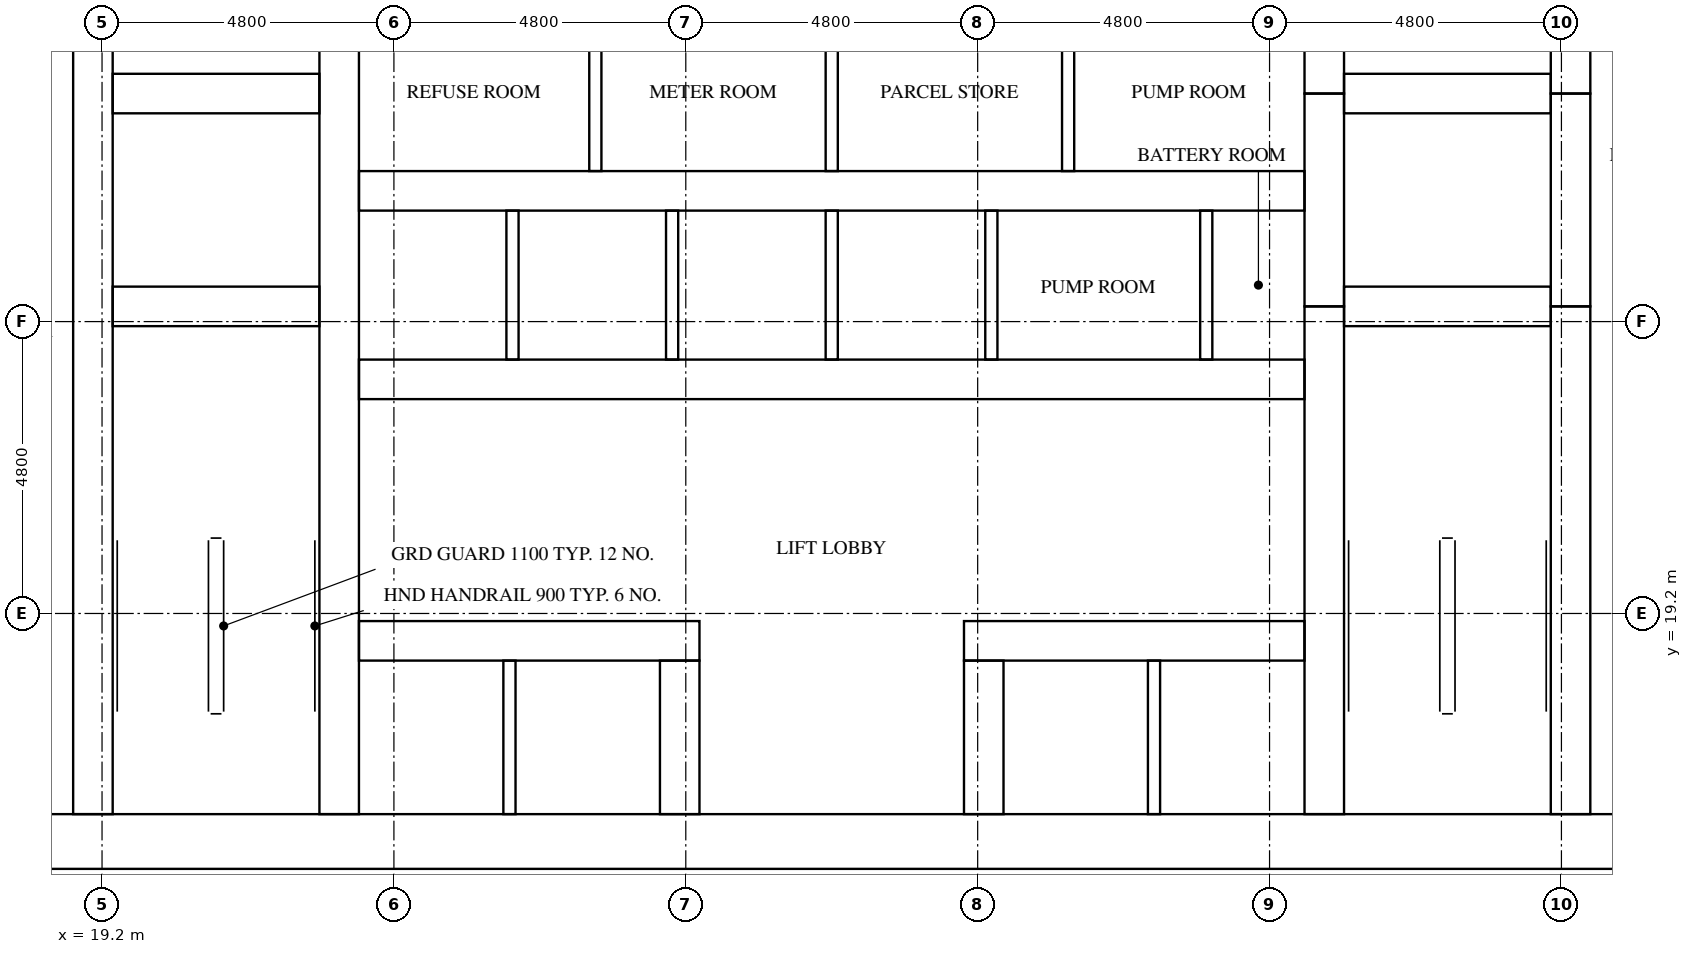
"""IFC4 building model, lengths in metres.
Left out: names, types, materials, properties, quantities, classifications, styles, units other than length and angle.
Written with IfcOpenShell. Run it as: python <this file> out.ifc"""

import sys

from ifc_helpers import new_model, si_unit, direction, frame, frame_2d, origin, place, context, subcontext, project, spatial, rectangle, extrude, element, fill, save


model = new_model("IFC4")
c1 = context("Model", 3, precision=1e-05, world=origin(), true_north=direction((0.0, 1.0)))
c2 = subcontext(c1, "Body", "Model", "MODEL_VIEW")
j1 = project(units=[si_unit("LENGTHUNIT", "METRE"), si_unit("PLANEANGLEUNIT", "RADIAN")], contexts=[c1])
p1 = place(None, origin())
s1 = spatial("IfcSite", under=j1, at=p1, CompositionType="ELEMENT")
p2 = place(p1, origin())
s2 = spatial("IfcBuilding", under=s1, at=p2, CompositionType="ELEMENT")
p3 = place(p2, frame((0.0, 0.0, 69.8)))
s3 = spatial("IfcBuildingStorey", under=s2, at=p3, CompositionType="ELEMENT", Elevation=69.8)
p4 = place(p3, frame((15.0, 15.45, 0.0), z_axis=(0.0, 0.0, 1.0), x_axis=(1.0, 0.0, 0.0)))
e1 = element("IfcWall", 1, at=p4, inside=s3, PredefinedType="SHEAR", context=c2, shape_type="SweptSolid", body=[
    extrude(rectangle(XDim=32.4, YDim=0.9, at=frame_2d((16.2, 0.0))), origin(), (0.0, 0.0, 1.0), 3.2),
])
p5 = place(p4, frame((15.3, 0.0, 0.0)))
e2 = element("IfcOpeningElement", 2, at=p5, cuts=e1, PredefinedType="OPENING", context=c2, shape_type="SweptSolid", body=[
    extrude(rectangle(XDim=1.8, YDim=2.1, at=frame_2d((0.9, 1.05))), frame((0.0, 0.46, 0.0), z_axis=(0.0, -1.0, 0.0), x_axis=(1.0, 0.0, 0.0)), (0.0, 0.0, 1.0), 0.92),
])
p6 = place(p3, frame((19.05, 15.9, 0.0), z_axis=(0.0, 0.0, 1.0), x_axis=(0.0, 1.0, 0.0)))
e3 = element("IfcWall", 3, at=p6, inside=s3, PredefinedType="SHEAR", context=c2, shape_type="SweptSolid", body=[
    extrude(rectangle(XDim=15.025, YDim=0.65, at=frame_2d((7.513, 0.0))), origin(), (0.0, 0.0, 1.0), 3.2),
])
p7 = place(p6, frame((9.55, 0.0, 0.0)))
e4 = element("IfcOpeningElement", 4, at=p7, cuts=e3, PredefinedType="OPENING", context=c2, shape_type="SweptSolid", body=[
    extrude(rectangle(XDim=1.1, YDim=2.1, at=frame_2d((0.55, 1.05))), frame((0.0, 0.335, 0.0), z_axis=(0.0, -1.0, 0.0), x_axis=(1.0, 0.0, 0.0)), (0.0, 0.0, 1.0), 0.67),
])
p8 = place(p6, frame((13.05, 0.0, 0.0)))
e5 = element("IfcOpeningElement", 5, at=p8, cuts=e3, PredefinedType="OPENING", context=c2, shape_type="SweptSolid", body=[
    extrude(rectangle(XDim=1.1, YDim=2.1, at=frame_2d((0.55, 1.05))), frame((0.0, 0.335, 0.0), z_axis=(0.0, -1.0, 0.0), x_axis=(1.0, 0.0, 0.0)), (0.0, 0.0, 1.0), 0.67),
])
p9 = place(p6, frame((0.3, 0.0, 0.0)))
e6 = element("IfcOpeningElement", 6, at=p9, cuts=e3, PredefinedType="OPENING", context=c2, shape_type="SweptSolid", body=[
    extrude(rectangle(XDim=1.2, YDim=2.1, at=frame_2d((0.6, 1.05))), frame((0.0, 0.335, 0.0), z_axis=(0.0, -1.0, 0.0), x_axis=(1.0, 0.0, 0.0)), (0.0, 0.0, 1.0), 0.67),
])
p10 = place(p3, frame((23.1, 15.9, 0.0), z_axis=(0.0, 0.0, 1.0), x_axis=(0.0, 1.0, 0.0)))
e7 = element("IfcWall", 7, at=p10, inside=s3, PredefinedType="SHEAR", context=c2, shape_type="SweptSolid", body=[
    extrude(rectangle(XDim=21.0, YDim=0.65, at=frame_2d((10.5, 0.0))), origin(), (0.0, 0.0, 1.0), 3.2),
])
p11 = place(p3, frame((39.3, 15.9, 0.0), z_axis=(0.0, 0.0, 1.0), x_axis=(0.0, 1.0, 0.0)))
e8 = element("IfcWall", 8, at=p11, inside=s3, PredefinedType="SHEAR", context=c2, shape_type="SweptSolid", body=[
    extrude(rectangle(XDim=8.35, YDim=0.65, at=frame_2d((4.175, 0.0))), origin(), (0.0, 0.0, 1.0), 3.2),
])
p12 = place(p3, frame((39.3, 24.25, 0.0), z_axis=(0.0, 0.0, 1.0), x_axis=(0.0, 1.0, 0.0)))
e9 = element("IfcWall", 9, at=p12, inside=s3, PredefinedType="SHEAR", context=c2, shape_type="SweptSolid", body=[
    extrude(rectangle(XDim=3.5, YDim=0.65, at=frame_2d((1.75, 0.0))), origin(), (0.0, 0.0, 1.0), 3.2),
])
p13 = place(p3, frame((39.3, 27.75, 0.0), z_axis=(0.0, 0.0, 1.0), x_axis=(0.0, 1.0, 0.0)))
e10 = element("IfcWall", 10, at=p13, inside=s3, PredefinedType="SHEAR", context=c2, shape_type="SweptSolid", body=[
    extrude(rectangle(XDim=9.15, YDim=0.65, at=frame_2d((4.575, 0.0))), origin(), (0.0, 0.0, 1.0), 3.2),
])
p14 = place(p3, frame((43.35, 15.9, 0.0), z_axis=(0.0, 0.0, 1.0), x_axis=(0.0, 1.0, 0.0)))
e11 = element("IfcWall", 11, at=p14, inside=s3, PredefinedType="SHEAR", context=c2, shape_type="SweptSolid", body=[
    extrude(rectangle(XDim=8.35, YDim=0.65, at=frame_2d((4.175, 0.0))), origin(), (0.0, 0.0, 1.0), 3.2),
])
p15 = place(p14, frame((0.3, 0.0, 0.0)))
e12 = element("IfcOpeningElement", 12, at=p15, cuts=e11, PredefinedType="OPENING", context=c2, shape_type="SweptSolid", body=[
    extrude(rectangle(XDim=1.2, YDim=2.1, at=frame_2d((0.6, 1.05))), frame((0.0, 0.335, 0.0), z_axis=(0.0, -1.0, 0.0), x_axis=(1.0, 0.0, 0.0)), (0.0, 0.0, 1.0), 0.67),
])
p16 = place(p3, frame((43.35, 24.25, 0.0), z_axis=(0.0, 0.0, 1.0), x_axis=(0.0, 1.0, 0.0)))
e13 = element("IfcWall", 13, at=p16, inside=s3, PredefinedType="SHEAR", context=c2, shape_type="SweptSolid", body=[
    extrude(rectangle(XDim=3.5, YDim=0.65, at=frame_2d((1.75, 0.0))), origin(), (0.0, 0.0, 1.0), 3.2),
])
p17 = place(p16, frame((1.2, 0.0, 0.0)))
e14 = element("IfcOpeningElement", 14, at=p17, cuts=e13, PredefinedType="OPENING", context=c2, shape_type="SweptSolid", body=[
    extrude(rectangle(XDim=1.1, YDim=2.1, at=frame_2d((0.55, 1.05))), frame((0.0, 0.335, 0.0), z_axis=(0.0, -1.0, 0.0), x_axis=(1.0, 0.0, 0.0)), (0.0, 0.0, 1.0), 0.67),
])
p18 = place(p3, frame((43.35, 27.75, 0.0), z_axis=(0.0, 0.0, 1.0), x_axis=(0.0, 1.0, 0.0)))
e15 = element("IfcWall", 15, at=p18, inside=s3, PredefinedType="SHEAR", context=c2, shape_type="SweptSolid", body=[
    extrude(rectangle(XDim=9.15, YDim=0.65, at=frame_2d((4.575, 0.0))), origin(), (0.0, 0.0, 1.0), 3.2),
])
p19 = place(p18, frame((7.65, 0.0, 0.0)))
e16 = element("IfcOpeningElement", 16, at=p19, cuts=e15, PredefinedType="OPENING", context=c2, shape_type="SweptSolid", body=[
    extrude(rectangle(XDim=1.2, YDim=2.1, at=frame_2d((0.6, 1.05))), frame((0.0, 0.335, 0.0), z_axis=(0.0, -1.0, 0.0), x_axis=(1.0, 0.0, 0.0)), (0.0, 0.0, 1.0), 0.67),
])
for number, where, z_axis, x_axis in (
    (17, (19.375, 24.25, 0.0), (0.0, 0.0, 1.0), (1.0, 0.0, 0.0)),
    (18, (19.375, 27.75, 0.0), (0.0, 0.0, 1.0), (1.0, 0.0, 0.0)),
    (19, (39.625, 24.25, 0.0), (0.0, 0.0, 1.0), (1.0, 0.0, 0.0)),
    (20, (39.625, 27.75, 0.0), (0.0, 0.0, 1.0), (1.0, 0.0, 0.0)),
):
    element("IfcWall", number, at=place(p3, frame(where, z_axis=z_axis, x_axis=x_axis)), inside=s3, PredefinedType="SHEAR", context=c2, shape_type="SweptSolid", body=[
        extrude(rectangle(XDim=3.4, YDim=0.65, at=frame_2d((1.7, 0.0))), origin(), (0.0, 0.0, 1.0), 3.2),
    ])
p20 = place(p3, frame((23.425, 18.75, 0.0), z_axis=(0.0, 0.0, 1.0), x_axis=(1.0, 0.0, 0.0)))
e21 = element("IfcWall", 21, at=p20, inside=s3, PredefinedType="SHEAR", context=c2, shape_type="SweptSolid", body=[
    extrude(rectangle(XDim=5.6, YDim=0.65, at=frame_2d((2.8, 0.0))), origin(), (0.0, 0.0, 1.0), 3.2),
])
p21 = place(p20, frame((0.637, 0.0, 0.0)))
e22 = element("IfcOpeningElement", 22, at=p21, cuts=e21, PredefinedType="OPENING", context=c2, shape_type="SweptSolid", body=[
    extrude(rectangle(XDim=1.1, YDim=2.1, at=frame_2d((0.55, 1.05))), frame((0.0, 0.335, 0.0), z_axis=(0.0, -1.0, 0.0), x_axis=(1.0, 0.0, 0.0)), (0.0, 0.0, 1.0), 0.67),
])
p22 = place(p20, frame((3.212, 0.0, 0.0)))
e23 = element("IfcOpeningElement", 23, at=p22, cuts=e21, PredefinedType="OPENING", context=c2, shape_type="SweptSolid", body=[
    extrude(rectangle(XDim=1.1, YDim=2.1, at=frame_2d((0.55, 1.05))), frame((0.0, 0.335, 0.0), z_axis=(0.0, -1.0, 0.0), x_axis=(1.0, 0.0, 0.0)), (0.0, 0.0, 1.0), 0.67),
])
p23 = place(p3, frame((33.375, 18.75, 0.0), z_axis=(0.0, 0.0, 1.0), x_axis=(1.0, 0.0, 0.0)))
e24 = element("IfcWall", 24, at=p23, inside=s3, PredefinedType="SHEAR", context=c2, shape_type="SweptSolid", body=[
    extrude(rectangle(XDim=5.6, YDim=0.65, at=frame_2d((2.8, 0.0))), origin(), (0.0, 0.0, 1.0), 3.2),
])
p24 = place(p23, frame((1.288, 0.0, 0.0)))
e25 = element("IfcOpeningElement", 25, at=p24, cuts=e24, PredefinedType="OPENING", context=c2, shape_type="SweptSolid", body=[
    extrude(rectangle(XDim=1.1, YDim=2.1, at=frame_2d((0.55, 1.05))), frame((0.0, 0.335, 0.0), z_axis=(0.0, -1.0, 0.0), x_axis=(1.0, 0.0, 0.0)), (0.0, 0.0, 1.0), 0.67),
])
p25 = place(p23, frame((3.863, 0.0, 0.0)))
e26 = element("IfcOpeningElement", 26, at=p25, cuts=e24, PredefinedType="OPENING", context=c2, shape_type="SweptSolid", body=[
    extrude(rectangle(XDim=1.1, YDim=2.1, at=frame_2d((0.55, 1.05))), frame((0.0, 0.335, 0.0), z_axis=(0.0, -1.0, 0.0), x_axis=(1.0, 0.0, 0.0)), (0.0, 0.0, 1.0), 0.67),
])
p26 = place(p3, frame((23.425, 23.05, 0.0), z_axis=(0.0, 0.0, 1.0), x_axis=(1.0, 0.0, 0.0)))
e27 = element("IfcWall", 27, at=p26, inside=s3, PredefinedType="SHEAR", context=c2, shape_type="SweptSolid", body=[
    extrude(rectangle(XDim=15.55, YDim=0.65, at=frame_2d((7.775, 0.0))), origin(), (0.0, 0.0, 1.0), 3.2),
])
p27 = place(p26, frame((0.663, 0.0, 0.0)))
e28 = element("IfcOpeningElement", 28, at=p27, cuts=e27, PredefinedType="OPENING", context=c2, shape_type="SweptSolid", body=[
    extrude(rectangle(XDim=1.1, YDim=2.1, at=frame_2d((0.55, 1.05))), frame((0.0, 0.335, 0.0), z_axis=(0.0, -1.0, 0.0), x_axis=(1.0, 0.0, 0.0)), (0.0, 0.0, 1.0), 0.67),
])
p28 = place(p26, frame((3.288, 0.0, 0.0)))
e29 = element("IfcOpeningElement", 29, at=p28, cuts=e27, PredefinedType="OPENING", context=c2, shape_type="SweptSolid", body=[
    extrude(rectangle(XDim=1.1, YDim=2.1, at=frame_2d((0.55, 1.05))), frame((0.0, 0.335, 0.0), z_axis=(0.0, -1.0, 0.0), x_axis=(1.0, 0.0, 0.0)), (0.0, 0.0, 1.0), 0.67),
])
p29 = place(p26, frame((11.667, 0.0, 0.0)))
e30 = element("IfcOpeningElement", 30, at=p29, cuts=e27, PredefinedType="OPENING", context=c2, shape_type="SweptSolid", body=[
    extrude(rectangle(XDim=1.0, YDim=2.1, at=frame_2d((0.5, 1.05))), frame((0.0, 0.335, 0.0), z_axis=(0.0, -1.0, 0.0), x_axis=(1.0, 0.0, 0.0)), (0.0, 0.0, 1.0), 0.67),
])
p30 = place(p26, frame((14.292, 0.0, 0.0)))
e31 = element("IfcOpeningElement", 31, at=p30, cuts=e27, PredefinedType="OPENING", context=c2, shape_type="SweptSolid", body=[
    extrude(rectangle(XDim=1.0, YDim=2.1, at=frame_2d((0.5, 1.05))), frame((0.0, 0.335, 0.0), z_axis=(0.0, -1.0, 0.0), x_axis=(1.0, 0.0, 0.0)), (0.0, 0.0, 1.0), 0.67),
])
p31 = place(p3, frame((23.425, 26.15, 0.0), z_axis=(0.0, 0.0, 1.0), x_axis=(1.0, 0.0, 0.0)))
e32 = element("IfcWall", 32, at=p31, inside=s3, PredefinedType="SHEAR", context=c2, shape_type="SweptSolid", body=[
    extrude(rectangle(XDim=15.55, YDim=0.65, at=frame_2d((7.775, 0.0))), origin(), (0.0, 0.0, 1.0), 3.2),
])
for number, where, z_axis, x_axis in (
    (33, (28.7, 15.9, 0.0), (0.0, 0.0, 1.0), (0.0, 1.0, 0.0)),
    (34, (33.7, 15.9, 0.0), (0.0, 0.0, 1.0), (0.0, 1.0, 0.0)),
):
    element("IfcWall", number, at=place(p3, frame(where, z_axis=z_axis, x_axis=x_axis)), inside=s3, PredefinedType="SHEAR", context=c2, shape_type="SweptSolid", body=[
        extrude(rectangle(XDim=2.525, YDim=0.65, at=frame_2d((1.263, 0.0))), origin(), (0.0, 0.0, 1.0), 3.2),
    ])
for number, where, z_axis, x_axis in (
    (35, (25.95, 23.375, 0.0), (0.0, 0.0, 1.0), (0.0, 1.0, 0.0)),
    (36, (28.575, 23.375, 0.0), (0.0, 0.0, 1.0), (0.0, 1.0, 0.0)),
    (37, (31.2, 23.375, 0.0), (0.0, 0.0, 1.0), (0.0, 1.0, 0.0)),
    (38, (33.825, 23.375, 0.0), (0.0, 0.0, 1.0), (0.0, 1.0, 0.0)),
):
    element("IfcWall", number, at=place(p3, frame(where, z_axis=z_axis, x_axis=x_axis)), inside=s3, PredefinedType="SOLIDWALL", context=c2, shape_type="SweptSolid", body=[
        extrude(rectangle(XDim=2.45, YDim=0.2, at=frame_2d((1.225, 0.0))), origin(), (0.0, 0.0, 1.0), 3.2),
    ])
for number, where, z_axis, x_axis in (
    (39, (25.9, 15.9, 0.0), (0.0, 0.0, 1.0), (0.0, 1.0, 0.0)),
    (40, (36.5, 15.9, 0.0), (0.0, 0.0, 1.0), (0.0, 1.0, 0.0)),
):
    element("IfcWall", number, at=place(p3, frame(where, z_axis=z_axis, x_axis=x_axis)), inside=s3, PredefinedType="SOLIDWALL", context=c2, shape_type="SweptSolid", body=[
        extrude(rectangle(XDim=2.525, YDim=0.2, at=frame_2d((1.263, 0.0))), origin(), (0.0, 0.0, 1.0), 3.2),
    ])
for number, where, z_axis, x_axis in (
    (41, (37.359, 23.375, 0.0), (0.0, 0.0, 1.0), (0.0, 1.0, 0.0)),
    (42, (27.312, 26.475, 0.0), (0.0, 0.0, 1.0), (0.0, 1.0, 0.0)),
    (43, (31.2, 26.475, 0.0), (0.0, 0.0, 1.0), (0.0, 1.0, 0.0)),
    (44, (35.087, 26.475, 0.0), (0.0, 0.0, 1.0), (0.0, 1.0, 0.0)),
):
    element("IfcWall", number, at=place(p3, frame(where, z_axis=z_axis, x_axis=x_axis)), inside=s3, PredefinedType="PARTITIONING", context=c2, shape_type="SweptSolid", body=[
        extrude(rectangle(XDim=2.45, YDim=0.2, at=frame_2d((1.225, 0.0))), origin(), (0.0, 0.0, 1.0), 3.2),
    ])
p32 = place(p21, origin())
e45 = element("IfcDoor", 45, at=p32, inside=s3, OperationType="DOUBLE_DOOR_SLIDING", PredefinedType="DOOR", context=c2, shape_type="SweptSolid", body=[
    extrude(rectangle(XDim=1.1, YDim=2.1, at=frame_2d((0.55, 1.05))), frame((0.0, 0.025, 0.0), z_axis=(0.0, -1.0, 0.0), x_axis=(1.0, 0.0, 0.0)), (0.0, 0.0, 1.0), 0.05),
])
fill(e22, e45)
p33 = place(p22, origin())
e46 = element("IfcDoor", 46, at=p33, inside=s3, OperationType="DOUBLE_DOOR_SLIDING", PredefinedType="DOOR", context=c2, shape_type="SweptSolid", body=[
    extrude(rectangle(XDim=1.1, YDim=2.1, at=frame_2d((0.55, 1.05))), frame((0.0, 0.025, 0.0), z_axis=(0.0, -1.0, 0.0), x_axis=(1.0, 0.0, 0.0)), (0.0, 0.0, 1.0), 0.05),
])
fill(e23, e46)
p34 = place(p24, origin())
e47 = element("IfcDoor", 47, at=p34, inside=s3, OperationType="DOUBLE_DOOR_SLIDING", PredefinedType="DOOR", context=c2, shape_type="SweptSolid", body=[
    extrude(rectangle(XDim=1.1, YDim=2.1, at=frame_2d((0.55, 1.05))), frame((0.0, 0.025, 0.0), z_axis=(0.0, -1.0, 0.0), x_axis=(1.0, 0.0, 0.0)), (0.0, 0.0, 1.0), 0.05),
])
fill(e25, e47)
p35 = place(p25, origin())
e48 = element("IfcDoor", 48, at=p35, inside=s3, OperationType="DOUBLE_DOOR_SLIDING", PredefinedType="DOOR", context=c2, shape_type="SweptSolid", body=[
    extrude(rectangle(XDim=1.1, YDim=2.1, at=frame_2d((0.55, 1.05))), frame((0.0, 0.025, 0.0), z_axis=(0.0, -1.0, 0.0), x_axis=(1.0, 0.0, 0.0)), (0.0, 0.0, 1.0), 0.05),
])
fill(e26, e48)
p36 = place(p27, origin())
e49 = element("IfcDoor", 49, at=p36, inside=s3, OperationType="DOUBLE_DOOR_SLIDING", PredefinedType="DOOR", context=c2, shape_type="SweptSolid", body=[
    extrude(rectangle(XDim=1.1, YDim=2.1, at=frame_2d((0.55, 1.05))), frame((0.0, 0.025, 0.0), z_axis=(0.0, -1.0, 0.0), x_axis=(1.0, 0.0, 0.0)), (0.0, 0.0, 1.0), 0.05),
])
fill(e28, e49)
p37 = place(p28, origin())
e50 = element("IfcDoor", 50, at=p37, inside=s3, OperationType="DOUBLE_DOOR_SLIDING", PredefinedType="DOOR", context=c2, shape_type="SweptSolid", body=[
    extrude(rectangle(XDim=1.1, YDim=2.1, at=frame_2d((0.55, 1.05))), frame((0.0, 0.025, 0.0), z_axis=(0.0, -1.0, 0.0), x_axis=(1.0, 0.0, 0.0)), (0.0, 0.0, 1.0), 0.05),
])
fill(e29, e50)
p38 = place(p7, origin())
e51 = element("IfcDoor", 51, at=p38, inside=s3, OperationType="DOUBLE_DOOR_SLIDING", PredefinedType="DOOR", context=c2, shape_type="SweptSolid", body=[
    extrude(rectangle(XDim=1.1, YDim=2.1, at=frame_2d((0.55, 1.05))), frame((0.0, 0.025, 0.0), z_axis=(0.0, -1.0, 0.0), x_axis=(1.0, 0.0, 0.0)), (0.0, 0.0, 1.0), 0.05),
])
fill(e4, e51)
p39 = place(p17, origin())
e52 = element("IfcDoor", 52, at=p39, inside=s3, OperationType="DOUBLE_DOOR_SLIDING", PredefinedType="DOOR", context=c2, shape_type="SweptSolid", body=[
    extrude(rectangle(XDim=1.1, YDim=2.1, at=frame_2d((0.55, 1.05))), frame((0.0, 0.025, 0.0), z_axis=(0.0, -1.0, 0.0), x_axis=(1.0, 0.0, 0.0)), (0.0, 0.0, 1.0), 0.05),
])
fill(e14, e52)
p40 = place(p9, frame((1.2, 0.0, 0.0), z_axis=(0.0, 0.0, 1.0), x_axis=(-1.0, 0.0, 0.0)))
e53 = element("IfcDoor", 53, at=p40, inside=s3, OperationType="SINGLE_SWING_LEFT", PredefinedType="DOOR", context=c2, shape_type="SweptSolid", body=[
    extrude(rectangle(XDim=1.2, YDim=2.1, at=frame_2d((0.6, 1.05))), frame((0.0, 0.025, 0.0), z_axis=(0.0, -1.0, 0.0), x_axis=(1.0, 0.0, 0.0)), (0.0, 0.0, 1.0), 0.05),
])
fill(e6, e53)
p41 = place(p15, origin())
e54 = element("IfcDoor", 54, at=p41, inside=s3, OperationType="SINGLE_SWING_RIGHT", PredefinedType="DOOR", context=c2, shape_type="SweptSolid", body=[
    extrude(rectangle(XDim=1.2, YDim=2.1, at=frame_2d((0.6, 1.05))), frame((0.0, 0.025, 0.0), z_axis=(0.0, -1.0, 0.0), x_axis=(1.0, 0.0, 0.0)), (0.0, 0.0, 1.0), 0.05),
])
fill(e12, e54)
p42 = place(p5, frame((1.8, 0.0, 0.0), z_axis=(0.0, 0.0, 1.0), x_axis=(-1.0, 0.0, 0.0)))
e55 = element("IfcDoor", 55, at=p42, inside=s3, OperationType="DOUBLE_DOOR_SINGLE_SWING", PredefinedType="DOOR", context=c2, shape_type="SweptSolid", body=[
    extrude(rectangle(XDim=1.8, YDim=2.1, at=frame_2d((0.9, 1.05))), frame((0.0, 0.025, 0.0), z_axis=(0.0, -1.0, 0.0), x_axis=(1.0, 0.0, 0.0)), (0.0, 0.0, 1.0), 0.05),
])
fill(e2, e55)
p43 = place(p29, frame((1.0, 0.0, 0.0), z_axis=(0.0, 0.0, 1.0), x_axis=(-1.0, 0.0, 0.0)))
e56 = element("IfcDoor", 56, at=p43, inside=s3, OperationType="SINGLE_SWING_RIGHT", PredefinedType="DOOR", context=c2, shape_type="SweptSolid", body=[
    extrude(rectangle(XDim=1.0, YDim=2.1, at=frame_2d((0.5, 1.05))), frame((0.0, 0.025, 0.0), z_axis=(0.0, -1.0, 0.0), x_axis=(1.0, 0.0, 0.0)), (0.0, 0.0, 1.0), 0.05),
])
fill(e30, e56)
p44 = place(p30, frame((1.0, 0.0, 0.0), z_axis=(0.0, 0.0, 1.0), x_axis=(-1.0, 0.0, 0.0)))
e57 = element("IfcDoor", 57, at=p44, inside=s3, OperationType="SINGLE_SWING_LEFT", PredefinedType="DOOR", context=c2, shape_type="SweptSolid", body=[
    extrude(rectangle(XDim=1.0, YDim=2.1, at=frame_2d((0.5, 1.05))), frame((0.0, 0.025, 0.0), z_axis=(0.0, -1.0, 0.0), x_axis=(1.0, 0.0, 0.0)), (0.0, 0.0, 1.0), 0.05),
])
fill(e31, e57)
save(model, sys.argv[1])
